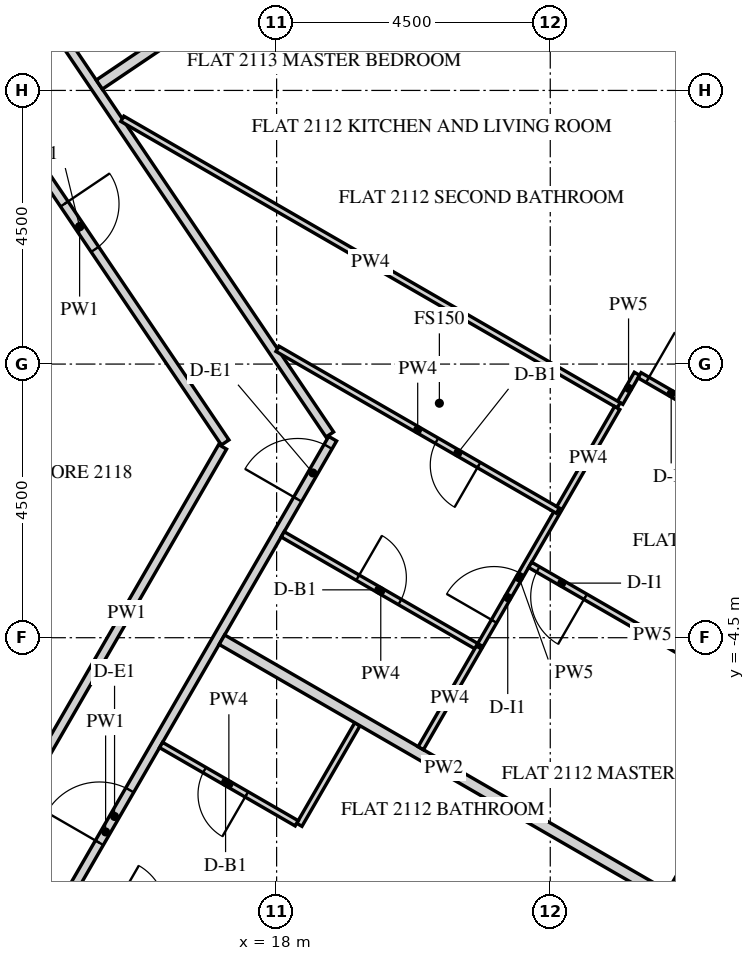
"""IFC4 building model, lengths in metres.
Left out: names, types, materials, properties, quantities, classifications, styles, units other than length and angle.
Written with IfcOpenShell. Run it as: python <this file> out.ifc"""

import sys

from ifc_helpers import new_model, si_unit, direction, frame, frame_2d, origin, place, context, subcontext, project, spatial, polyline, rectangle, outline, extrude, element, fill, save


model = new_model("IFC4")
c1 = context("Model", 3, precision=1e-05, world=origin(), true_north=direction((0.0, 1.0)))
c2 = subcontext(c1, "Body", "Model", "MODEL_VIEW")
j1 = project(units=[si_unit("LENGTHUNIT", "METRE"), si_unit("PLANEANGLEUNIT", "RADIAN")], contexts=[c1])
p1 = place(None, origin())
s1 = spatial("IfcSite", under=j1, at=p1, CompositionType="ELEMENT")
p2 = place(p1, origin())
s2 = spatial("IfcBuilding", under=s1, at=p2, CompositionType="ELEMENT")
p3 = place(p2, frame((0.0, 0.0, 267.9)))
s3 = spatial("IfcBuildingStorey", under=s2, at=p3, CompositionType="ELEMENT", Elevation=267.9)
p4 = place(p3, frame((16.451, -23.005, -0.15), z_axis=(0.0, 0.0, 1.0), x_axis=(0.500003737743, 0.866023245787, 0.0)))
e1 = element("IfcWall", 1, at=p4, inside=s3, PredefinedType="SOLIDWALL", context=c2, shape_type="SweptSolid", body=[
    extrude(outline(polyline([(-0.021, -0.25), (25.468, -0.25), (25.421, 0.25), (0.021, 0.25), (-0.021, -0.25)])), origin(), (0.0, 0.0, 1.0), 3.9),
])
p5 = place(p4, frame((2.522, 0.0, 0.75)))
e2 = element("IfcOpeningElement", 2, at=p5, cuts=e1, PredefinedType="OPENING", context=c2, shape_type="SweptSolid", body=[
    extrude(rectangle(XDim=2.4, YDim=2.7, at=frame_2d((1.2, 1.35))), frame((0.0, 0.26, 0.0), z_axis=(0.0, -1.0, 0.0), x_axis=(1.0, 0.0, 0.0)), (0.0, 0.0, 1.0), 0.52),
])
p6 = place(p4, frame((6.122, 0.0, 0.75)))
e3 = element("IfcOpeningElement", 3, at=p6, cuts=e1, PredefinedType="OPENING", context=c2, shape_type="SweptSolid", body=[
    extrude(rectangle(XDim=2.4, YDim=2.7, at=frame_2d((1.2, 1.35))), frame((0.0, 0.26, 0.0), z_axis=(0.0, -1.0, 0.0), x_axis=(1.0, 0.0, 0.0)), (0.0, 0.0, 1.0), 0.52),
])
p7 = place(p4, frame((9.722, 0.0, 0.75)))
e4 = element("IfcOpeningElement", 4, at=p7, cuts=e1, PredefinedType="OPENING", context=c2, shape_type="SweptSolid", body=[
    extrude(rectangle(XDim=2.4, YDim=2.7, at=frame_2d((1.2, 1.35))), frame((0.0, 0.26, 0.0), z_axis=(0.0, -1.0, 0.0), x_axis=(1.0, 0.0, 0.0)), (0.0, 0.0, 1.0), 0.52),
])
p8 = place(p4, frame((13.323, 0.0, 0.75)))
e5 = element("IfcOpeningElement", 5, at=p8, cuts=e1, PredefinedType="OPENING", context=c2, shape_type="SweptSolid", body=[
    extrude(rectangle(XDim=2.4, YDim=2.7, at=frame_2d((1.2, 1.35))), frame((0.0, 0.26, 0.0), z_axis=(0.0, -1.0, 0.0), x_axis=(1.0, 0.0, 0.0)), (0.0, 0.0, 1.0), 0.52),
])
p9 = place(p4, frame((16.922, 0.0, 0.75)))
e6 = element("IfcOpeningElement", 6, at=p9, cuts=e1, PredefinedType="OPENING", context=c2, shape_type="SweptSolid", body=[
    extrude(rectangle(XDim=2.4, YDim=2.7, at=frame_2d((1.2, 1.35))), frame((0.0, 0.26, 0.0), z_axis=(0.0, -1.0, 0.0), x_axis=(1.0, 0.0, 0.0)), (0.0, 0.0, 1.0), 0.52),
])
p10 = place(p4, frame((20.522, 0.0, 0.75)))
e7 = element("IfcOpeningElement", 7, at=p10, cuts=e1, PredefinedType="OPENING", context=c2, shape_type="SweptSolid", body=[
    extrude(rectangle(XDim=2.4, YDim=2.7, at=frame_2d((1.2, 1.35))), frame((0.0, 0.26, 0.0), z_axis=(0.0, -1.0, 0.0), x_axis=(1.0, 0.0, 0.0)), (0.0, 0.0, 1.0), 0.52),
])
p11 = place(p3, frame((26.706, 2.879, -0.15), z_axis=(0.0, 0.0, 1.0), x_axis=(-0.559197891507, 0.829034208061, 0.0)))
e8 = element("IfcWall", 8, at=p11, inside=s3, PredefinedType="SOLIDWALL", context=c2, shape_type="SweptSolid", body=[
    extrude(outline(polyline([(0.25, -0.25), (22.795, -0.25), (23.295, 0.25), (-0.25, 0.25), (0.25, -0.25)])), origin(), (0.0, 0.0, 1.0), 3.9),
])
p12 = place(p11, frame((1.323, 0.0, 1.05)))
e9 = element("IfcOpeningElement", 9, at=p12, cuts=e8, PredefinedType="OPENING", context=c2, shape_type="SweptSolid", body=[
    extrude(rectangle(XDim=0.9, YDim=1.5, at=frame_2d((0.45, 0.75))), frame((0.0, 0.26, 0.0), z_axis=(0.0, -1.0, 0.0), x_axis=(1.0, 0.0, 0.0)), (0.0, 0.0, 1.0), 0.52),
])
p13 = place(p11, frame((2.522, 0.0, 0.15)))
e10 = element("IfcOpeningElement", 10, at=p13, cuts=e8, PredefinedType="OPENING", context=c2, shape_type="SweptSolid", body=[
    extrude(rectangle(XDim=1.2, YDim=2.4, at=frame_2d((0.6, 1.2))), frame((0.0, 0.26, 0.0), z_axis=(0.0, -1.0, 0.0), x_axis=(1.0, 0.0, 0.0)), (0.0, 0.0, 1.0), 0.52),
])
p14 = place(p11, frame((4.922, 0.0, 1.05)))
e11 = element("IfcOpeningElement", 11, at=p14, cuts=e8, PredefinedType="OPENING", context=c2, shape_type="SweptSolid", body=[
    extrude(rectangle(XDim=0.9, YDim=1.5, at=frame_2d((0.45, 0.75))), frame((0.0, 0.26, 0.0), z_axis=(0.0, -1.0, 0.0), x_axis=(1.0, 0.0, 0.0)), (0.0, 0.0, 1.0), 0.52),
])
p15 = place(p11, frame((6.122, 0.0, 0.15)))
e12 = element("IfcOpeningElement", 12, at=p15, cuts=e8, PredefinedType="OPENING", context=c2, shape_type="SweptSolid", body=[
    extrude(rectangle(XDim=1.2, YDim=2.4, at=frame_2d((0.6, 1.2))), frame((0.0, 0.26, 0.0), z_axis=(0.0, -1.0, 0.0), x_axis=(1.0, 0.0, 0.0)), (0.0, 0.0, 1.0), 0.52),
])
p16 = place(p11, frame((8.522, 0.0, 1.05)))
e13 = element("IfcOpeningElement", 13, at=p16, cuts=e8, PredefinedType="OPENING", context=c2, shape_type="SweptSolid", body=[
    extrude(rectangle(XDim=0.9, YDim=1.5, at=frame_2d((0.45, 0.75))), frame((0.0, 0.26, 0.0), z_axis=(0.0, -1.0, 0.0), x_axis=(1.0, 0.0, 0.0)), (0.0, 0.0, 1.0), 0.52),
])
p17 = place(p11, frame((9.722, 0.0, 0.15)))
e14 = element("IfcOpeningElement", 14, at=p17, cuts=e8, PredefinedType="OPENING", context=c2, shape_type="SweptSolid", body=[
    extrude(rectangle(XDim=1.2, YDim=2.4, at=frame_2d((0.6, 1.2))), frame((0.0, 0.26, 0.0), z_axis=(0.0, -1.0, 0.0), x_axis=(1.0, 0.0, 0.0)), (0.0, 0.0, 1.0), 0.52),
])
p18 = place(p11, frame((12.122, 0.0, 1.05)))
e15 = element("IfcOpeningElement", 15, at=p18, cuts=e8, PredefinedType="OPENING", context=c2, shape_type="SweptSolid", body=[
    extrude(rectangle(XDim=0.9, YDim=1.5, at=frame_2d((0.45, 0.75))), frame((0.0, 0.26, 0.0), z_axis=(0.0, -1.0, 0.0), x_axis=(1.0, 0.0, 0.0)), (0.0, 0.0, 1.0), 0.52),
])
p19 = place(p11, frame((13.323, 0.0, 0.15)))
e16 = element("IfcOpeningElement", 16, at=p19, cuts=e8, PredefinedType="OPENING", context=c2, shape_type="SweptSolid", body=[
    extrude(rectangle(XDim=1.2, YDim=2.4, at=frame_2d((0.6, 1.2))), frame((0.0, 0.26, 0.0), z_axis=(0.0, -1.0, 0.0), x_axis=(1.0, 0.0, 0.0)), (0.0, 0.0, 1.0), 0.52),
])
p20 = place(p11, frame((15.722, 0.0, 1.05)))
e17 = element("IfcOpeningElement", 17, at=p20, cuts=e8, PredefinedType="OPENING", context=c2, shape_type="SweptSolid", body=[
    extrude(rectangle(XDim=0.9, YDim=1.5, at=frame_2d((0.45, 0.75))), frame((0.0, 0.26, 0.0), z_axis=(0.0, -1.0, 0.0), x_axis=(1.0, 0.0, 0.0)), (0.0, 0.0, 1.0), 0.52),
])
p21 = place(p11, frame((16.922, 0.0, 0.15)))
e18 = element("IfcOpeningElement", 18, at=p21, cuts=e8, PredefinedType="OPENING", context=c2, shape_type="SweptSolid", body=[
    extrude(rectangle(XDim=1.2, YDim=2.4, at=frame_2d((0.6, 1.2))), frame((0.0, 0.26, 0.0), z_axis=(0.0, -1.0, 0.0), x_axis=(1.0, 0.0, 0.0)), (0.0, 0.0, 1.0), 0.52),
])
p22 = place(p11, frame((19.323, 0.0, 1.05)))
e19 = element("IfcOpeningElement", 19, at=p22, cuts=e8, PredefinedType="OPENING", context=c2, shape_type="SweptSolid", body=[
    extrude(rectangle(XDim=0.9, YDim=1.5, at=frame_2d((0.45, 0.75))), frame((0.0, 0.26, 0.0), z_axis=(0.0, -1.0, 0.0), x_axis=(1.0, 0.0, 0.0)), (0.0, 0.0, 1.0), 0.52),
])
p23 = place(p11, frame((20.522, 0.0, 0.15)))
e20 = element("IfcOpeningElement", 20, at=p23, cuts=e8, PredefinedType="OPENING", context=c2, shape_type="SweptSolid", body=[
    extrude(rectangle(XDim=1.2, YDim=2.4, at=frame_2d((0.6, 1.2))), frame((0.0, 0.26, 0.0), z_axis=(0.0, -1.0, 0.0), x_axis=(1.0, 0.0, 0.0)), (0.0, 0.0, 1.0), 0.52),
])
p24 = place(p3, frame((11.454, -14.16, 0.0), z_axis=(0.0, 0.0, 1.0), x_axis=(0.500000296604, 0.86602523254, 0.0)))
e21 = element("IfcWall", 21, at=p24, inside=s3, PredefinedType="PARTITIONING", context=c2, shape_type="SweptSolid", body=[
    extrude(rectangle(XDim=14.934, YDim=0.15, at=frame_2d((7.467, 0.0))), origin(), (0.0, 0.0, 1.0), 2.988),
])
p25 = place(p24, frame((7.261, 0.0, 0.0)))
e22 = element("IfcOpeningElement", 22, at=p25, cuts=e21, PredefinedType="OPENING", context=c2, shape_type="SweptSolid", body=[
    extrude(rectangle(XDim=1.0, YDim=2.1, at=frame_2d((0.5, 1.05))), frame((0.0, 0.085, 0.0), z_axis=(0.0, -1.0, 0.0), x_axis=(1.0, 0.0, 0.0)), (0.0, 0.0, 1.0), 0.17),
])
p26 = place(p24, frame((13.784, 0.0, 0.0)))
e23 = element("IfcOpeningElement", 23, at=p26, cuts=e21, PredefinedType="OPENING", context=c2, shape_type="SweptSolid", body=[
    extrude(rectangle(XDim=1.0, YDim=2.1, at=frame_2d((0.5, 1.05))), frame((0.0, 0.085, 0.0), z_axis=(0.0, -1.0, 0.0), x_axis=(1.0, 0.0, 0.0)), (0.0, 0.0, 1.0), 0.17),
])
p27 = place(p3, frame((18.875, -1.158, 0.0), z_axis=(0.0, 0.0, 1.0), x_axis=(-0.55919880344, 0.829033592945, 0.0)))
e24 = element("IfcWall", 24, at=p27, inside=s3, PredefinedType="PARTITIONING", context=c2, shape_type="SweptSolid", body=[
    extrude(rectangle(XDim=16.939, YDim=0.15, at=frame_2d((8.47, 0.0))), origin(), (0.0, 0.0, 1.0), 2.988),
])
p28 = place(p27, frame((9.69, 0.0, 0.0)))
e25 = element("IfcOpeningElement", 25, at=p28, cuts=e24, PredefinedType="OPENING", context=c2, shape_type="SweptSolid", body=[
    extrude(rectangle(XDim=1.0, YDim=2.1, at=frame_2d((0.5, 1.05))), frame((0.0, 0.085, 0.0), z_axis=(0.0, -1.0, 0.0), x_axis=(1.0, 0.0, 0.0)), (0.0, 0.0, 1.0), 0.17),
])
p29 = place(p3, frame((12.367, 5.808, 0.0), z_axis=(0.0, 0.0, 1.0), x_axis=(0.559187256666, -0.829041381345, 0.0)))
e26 = element("IfcWall", 26, at=p29, inside=s3, PredefinedType="PARTITIONING", context=c2, shape_type="SweptSolid", body=[
    extrude(rectangle(XDim=8.56, YDim=0.15, at=frame_2d((4.28, 0.0))), origin(), (0.0, 0.0, 1.0), 2.988),
])
p30 = place(p29, frame((3.83, 0.0, 0.0)))
e27 = element("IfcOpeningElement", 27, at=p30, cuts=e26, PredefinedType="OPENING", context=c2, shape_type="SweptSolid", body=[
    extrude(rectangle(XDim=0.9, YDim=2.1, at=frame_2d((0.45, 1.05))), frame((0.0, 0.085, 0.0), z_axis=(0.0, -1.0, 0.0), x_axis=(1.0, 0.0, 0.0)), (0.0, 0.0, 1.0), 0.17),
])
p31 = place(p3, frame((17.112, -1.362, 0.0), z_axis=(0.0, 0.0, 1.0), x_axis=(-0.49999985423, -0.866025487945, 0.0)))
e28 = element("IfcWall", 28, at=p31, inside=s3, PredefinedType="PARTITIONING", context=c2, shape_type="SweptSolid", body=[
    extrude(rectangle(XDim=6.298, YDim=0.15, at=frame_2d((3.149, 0.0))), origin(), (0.0, 0.0, 1.0), 2.988),
])
p32 = place(p3, frame((19.328, -5.923, 0.0), z_axis=(0.0, 0.0, 1.0), x_axis=(-0.500043324278, -0.866000389056, 0.0)))
e29 = element("IfcWall", 29, at=p32, inside=s3, PredefinedType="PARTITIONING", context=c2, shape_type="SweptSolid", body=[
    extrude(rectangle(XDim=1.91, YDim=0.1, at=frame_2d((0.955, 0.0))), origin(), (0.0, 0.0, 1.0), 2.988),
])
p33 = place(p3, frame((18.33, -7.552, 0.0), z_axis=(0.0, 0.0, 1.0), x_axis=(-0.866046643894, 0.499963209246, 0.0)))
e30 = element("IfcWall", 30, at=p33, inside=s3, PredefinedType="PARTITIONING", context=c2, shape_type="SweptSolid", body=[
    extrude(rectangle(XDim=2.575, YDim=0.1, at=frame_2d((1.288, 0.0))), origin(), (0.0, 0.0, 1.0), 2.988),
])
p34 = place(p33, frame((0.95, 0.0, 0.0)))
e31 = element("IfcOpeningElement", 31, at=p34, cuts=e30, PredefinedType="OPENING", context=c2, shape_type="SweptSolid", body=[
    extrude(rectangle(XDim=0.8, YDim=2.1, at=frame_2d((0.4, 1.05))), frame((0.0, 0.06, 0.0), z_axis=(0.0, -1.0, 0.0), x_axis=(1.0, 0.0, 0.0)), (0.0, 0.0, 1.0), 0.12),
])
p35 = place(p3, frame((24.396, -8.745, 0.0), z_axis=(0.0, 0.0, 1.0), x_axis=(-0.866014270972, 0.500019282102, 0.0)))
e32 = element("IfcWall", 32, at=p35, inside=s3, PredefinedType="PARTITIONING", context=c2, shape_type="SweptSolid", body=[
    extrude(rectangle(XDim=8.425, YDim=0.18, at=frame_2d((4.212, 0.0))), origin(), (0.0, 0.0, 1.0), 2.988),
])
p36 = place(p3, frame((23.65, -0.637, 0.0), z_axis=(0.0, 0.0, 1.0), x_axis=(0.500181810019, 0.865920410272, 0.0)))
e33 = element("IfcWall", 33, at=p36, inside=s3, PredefinedType="PARTITIONING", context=c2, shape_type="SweptSolid", body=[
    extrude(rectangle(XDim=0.552, YDim=0.1, at=frame_2d((0.276, 0.0))), origin(), (0.0, 0.0, 1.0), 2.988),
])
p37 = place(p3, frame((23.969, -0.184, 0.0), z_axis=(0.0, 0.0, 1.0), x_axis=(0.866011596997, -0.500023913295, 0.0)))
e34 = element("IfcWall", 34, at=p37, inside=s3, PredefinedType="PARTITIONING", context=c2, shape_type="SweptSolid", body=[
    extrude(rectangle(XDim=4.65, YDim=0.1, at=frame_2d((2.325, 0.0))), origin(), (0.0, 0.0, 1.0), 2.988),
])
p38 = place(p37, frame((0.15, 0.0, 0.0)))
e35 = element("IfcOpeningElement", 35, at=p38, cuts=e34, PredefinedType="OPENING", context=c2, shape_type="SweptSolid", body=[
    extrude(rectangle(XDim=0.9, YDim=2.1, at=frame_2d((0.45, 1.05))), frame((0.0, 0.06, 0.0), z_axis=(0.0, -1.0, 0.0), x_axis=(1.0, 0.0, 0.0)), (0.0, 0.0, 1.0), 0.12),
])
p39 = place(p3, frame((15.463, 4.034, 0.0), z_axis=(0.0, 0.0, 1.0), x_axis=(0.866033324905, -0.499986279965, 0.0)))
e36 = element("IfcWall", 36, at=p39, inside=s3, PredefinedType="PARTITIONING", context=c2, shape_type="SweptSolid", body=[
    extrude(rectangle(XDim=9.426, YDim=0.1, at=frame_2d((4.713, 0.0))), origin(), (0.0, 0.0, 1.0), 2.988),
])
p40 = place(p3, frame((22.069, 9.307, 0.0), z_axis=(0.0, 0.0, 1.0), x_axis=(-0.829046823816, -0.559179187668, 0.0)))
e37 = element("IfcWall", 37, at=p40, inside=s3, PredefinedType="PARTITIONING", context=c2, shape_type="SweptSolid", body=[
    extrude(rectangle(XDim=8.425, YDim=0.18, at=frame_2d((4.213, 0.0))), origin(), (0.0, 0.0, 1.0), 2.988),
])
p41 = place(p3, frame((18.1, -2.8, 0.0), z_axis=(0.0, 0.0, 1.0), x_axis=(0.866012039196, -0.500023147432, 0.0)))
e38 = element("IfcWall", 38, at=p41, inside=s3, PredefinedType="PARTITIONING", context=c2, shape_type="SweptSolid", body=[
    extrude(rectangle(XDim=3.725, YDim=0.1, at=frame_2d((1.862, 0.0))), origin(), (0.0, 0.0, 1.0), 2.988),
])
p42 = place(p41, frame((1.425, 0.0, 0.0)))
e39 = element("IfcOpeningElement", 39, at=p42, cuts=e38, PredefinedType="OPENING", context=c2, shape_type="SweptSolid", body=[
    extrude(rectangle(XDim=0.8, YDim=2.1, at=frame_2d((0.4, 1.05))), frame((0.0, 0.06, 0.0), z_axis=(0.0, -1.0, 0.0), x_axis=(1.0, 0.0, 0.0)), (0.0, 0.0, 1.0), 0.12),
])
p43 = place(p3, frame((21.35, -4.621, 0.0), z_axis=(0.0, 0.0, 1.0), x_axis=(0.500056202316, 0.865992952931, 0.0)))
e40 = element("IfcWall", 40, at=p43, inside=s3, PredefinedType="PARTITIONING", context=c2, shape_type="SweptSolid", body=[
    extrude(rectangle(XDim=2.554, YDim=0.1, at=frame_2d((1.277, 0.0))), origin(), (0.0, 0.0, 1.0), 2.988),
])
p44 = place(p43, frame((0.452, 0.0, 0.0)))
e41 = element("IfcOpeningElement", 41, at=p44, cuts=e40, PredefinedType="OPENING", context=c2, shape_type="SweptSolid", body=[
    extrude(rectangle(XDim=0.9, YDim=2.1, at=frame_2d((0.45, 1.05))), frame((0.0, 0.06, 0.0), z_axis=(0.0, -1.0, 0.0), x_axis=(1.0, 0.0, 0.0)), (0.0, 0.0, 1.0), 0.12),
])
p45 = place(p3, frame((22.626, -2.411, 0.0), z_axis=(0.0, 0.0, 1.0), x_axis=(-0.866016851835, 0.500014812119, 0.0)))
e42 = element("IfcWall", 42, at=p45, inside=s3, PredefinedType="PARTITIONING", context=c2, shape_type="SweptSolid", body=[
    extrude(rectangle(XDim=5.325, YDim=0.1, at=frame_2d((2.663, 0.0))), origin(), (0.0, 0.0, 1.0), 2.988),
])
p46 = place(p45, frame((1.5, 0.0, 0.0)))
e43 = element("IfcOpeningElement", 43, at=p46, cuts=e42, PredefinedType="OPENING", context=c2, shape_type="SweptSolid", body=[
    extrude(rectangle(XDim=0.8, YDim=2.1, at=frame_2d((0.4, 1.05))), frame((0.0, 0.06, 0.0), z_axis=(0.0, -1.0, 0.0), x_axis=(1.0, 0.0, 0.0)), (0.0, 0.0, 1.0), 0.12),
])
p47 = place(p3, frame((20.371, -6.317, 0.0), z_axis=(0.0, 0.0, 1.0), x_axis=(0.49994353734, 0.866058000062, 0.0)))
e44 = element("IfcWall", 44, at=p47, inside=s3, PredefinedType="PARTITIONING", context=c2, shape_type="SweptSolid", body=[
    extrude(rectangle(XDim=1.912, YDim=0.1, at=frame_2d((0.956, 0.0))), origin(), (0.0, 0.0, 1.0), 2.988),
])
p48 = place(p3, frame((26.196, -5.627, 0.0), z_axis=(0.0, 0.0, 1.0), x_axis=(-0.866011596997, 0.500023913295, 0.0)))
e45 = element("IfcWall", 45, at=p48, inside=s3, PredefinedType="PARTITIONING", context=c2, shape_type="SweptSolid", body=[
    extrude(rectangle(XDim=4.65, YDim=0.1, at=frame_2d((2.325, 0.0))), origin(), (0.0, 0.0, 1.0), 2.988),
])
p49 = place(p48, frame((3.6, 0.0, 0.0)))
e46 = element("IfcOpeningElement", 46, at=p49, cuts=e45, PredefinedType="OPENING", context=c2, shape_type="SweptSolid", body=[
    extrude(rectangle(XDim=0.9, YDim=2.1, at=frame_2d((0.45, 1.05))), frame((0.0, 0.06, 0.0), z_axis=(0.0, -1.0, 0.0), x_axis=(1.0, 0.0, 0.0)), (0.0, 0.0, 1.0), 0.12),
])
p50 = place(p3, frame((23.601, -0.722, 0.0), z_axis=(0.0, 0.0, 1.0), x_axis=(-0.500119165741, -0.865956592479, 0.0)))
e47 = element("IfcWall", 47, at=p50, inside=s3, PredefinedType="PARTITIONING", context=c2, shape_type="SweptSolid", body=[
    extrude(rectangle(XDim=1.9, YDim=0.1, at=frame_2d((0.95, 0.0))), origin(), (0.0, 0.0, 1.0), 2.988),
])
p51 = place(p13, frame((0.0, 0.175, 0.0)))
e48 = element("IfcDoor", 48, at=p51, inside=s3, OperationType="SLIDING_TO_LEFT", PredefinedType="DOOR", context=c2, shape_type="SweptSolid", body=[
    extrude(rectangle(XDim=1.2, YDim=2.4, at=frame_2d((0.6, 1.2))), frame((0.0, 0.025, 0.0), z_axis=(0.0, -1.0, 0.0), x_axis=(1.0, 0.0, 0.0)), (0.0, 0.0, 1.0), 0.05),
])
fill(e10, e48)
p52 = place(p25, origin())
e49 = element("IfcDoor", 49, at=p52, inside=s3, OperationType="SINGLE_SWING_RIGHT", PredefinedType="DOOR", context=c2, shape_type="SweptSolid", body=[
    extrude(rectangle(XDim=1.0, YDim=2.1, at=frame_2d((0.5, 1.05))), frame((0.0, 0.025, 0.0), z_axis=(0.0, -1.0, 0.0), x_axis=(1.0, 0.0, 0.0)), (0.0, 0.0, 1.0), 0.05),
])
fill(e22, e49)
p53 = place(p34, origin())
e50 = element("IfcDoor", 50, at=p53, inside=s3, OperationType="SINGLE_SWING_LEFT", PredefinedType="DOOR", context=c2, shape_type="SweptSolid", body=[
    extrude(rectangle(XDim=0.8, YDim=2.1, at=frame_2d((0.4, 1.05))), frame((0.0, 0.025, 0.0), z_axis=(0.0, -1.0, 0.0), x_axis=(1.0, 0.0, 0.0)), (0.0, 0.0, 1.0), 0.05),
])
fill(e31, e50)
p54 = place(p26, origin())
e51 = element("IfcDoor", 51, at=p54, inside=s3, OperationType="SINGLE_SWING_LEFT", PredefinedType="DOOR", context=c2, shape_type="SweptSolid", body=[
    extrude(rectangle(XDim=1.0, YDim=2.1, at=frame_2d((0.5, 1.05))), frame((0.0, 0.025, 0.0), z_axis=(0.0, -1.0, 0.0), x_axis=(1.0, 0.0, 0.0)), (0.0, 0.0, 1.0), 0.05),
])
fill(e23, e51)
p55 = place(p42, origin())
e52 = element("IfcDoor", 52, at=p55, inside=s3, OperationType="SINGLE_SWING_RIGHT", PredefinedType="DOOR", context=c2, shape_type="SweptSolid", body=[
    extrude(rectangle(XDim=0.8, YDim=2.1, at=frame_2d((0.4, 1.05))), frame((0.0, 0.025, 0.0), z_axis=(0.0, -1.0, 0.0), x_axis=(1.0, 0.0, 0.0)), (0.0, 0.0, 1.0), 0.05),
])
fill(e39, e52)
p56 = place(p44, origin())
e53 = element("IfcDoor", 53, at=p56, inside=s3, OperationType="SINGLE_SWING_LEFT", PredefinedType="DOOR", context=c2, shape_type="SweptSolid", body=[
    extrude(rectangle(XDim=0.9, YDim=2.1, at=frame_2d((0.45, 1.05))), frame((0.0, 0.025, 0.0), z_axis=(0.0, -1.0, 0.0), x_axis=(1.0, 0.0, 0.0)), (0.0, 0.0, 1.0), 0.05),
])
fill(e41, e53)
p57 = place(p49, origin())
e54 = element("IfcDoor", 54, at=p57, inside=s3, OperationType="SINGLE_SWING_RIGHT", PredefinedType="DOOR", context=c2, shape_type="SweptSolid", body=[
    extrude(rectangle(XDim=0.9, YDim=2.1, at=frame_2d((0.45, 1.05))), frame((0.0, 0.025, 0.0), z_axis=(0.0, -1.0, 0.0), x_axis=(1.0, 0.0, 0.0)), (0.0, 0.0, 1.0), 0.05),
])
fill(e46, e54)
p58 = place(p38, origin())
e55 = element("IfcDoor", 55, at=p58, inside=s3, OperationType="SINGLE_SWING_RIGHT", PredefinedType="DOOR", context=c2, shape_type="SweptSolid", body=[
    extrude(rectangle(XDim=0.9, YDim=2.1, at=frame_2d((0.45, 1.05))), frame((0.0, 0.025, 0.0), z_axis=(0.0, -1.0, 0.0), x_axis=(1.0, 0.0, 0.0)), (0.0, 0.0, 1.0), 0.05),
])
fill(e35, e55)
p59 = place(p46, origin())
e56 = element("IfcDoor", 56, at=p59, inside=s3, OperationType="SINGLE_SWING_RIGHT", PredefinedType="DOOR", context=c2, shape_type="SweptSolid", body=[
    extrude(rectangle(XDim=0.8, YDim=2.1, at=frame_2d((0.4, 1.05))), frame((0.0, 0.025, 0.0), z_axis=(0.0, -1.0, 0.0), x_axis=(1.0, 0.0, 0.0)), (0.0, 0.0, 1.0), 0.05),
])
fill(e43, e56)
p60 = place(p30, origin())
e57 = element("IfcDoor", 57, at=p60, inside=s3, OperationType="SINGLE_SWING_RIGHT", PredefinedType="DOOR", context=c2, shape_type="SweptSolid", body=[
    extrude(rectangle(XDim=0.9, YDim=2.1, at=frame_2d((0.45, 1.05))), frame((0.0, 0.025, 0.0), z_axis=(0.0, -1.0, 0.0), x_axis=(1.0, 0.0, 0.0)), (0.0, 0.0, 1.0), 0.05),
])
fill(e27, e57)
save(model, sys.argv[1])
